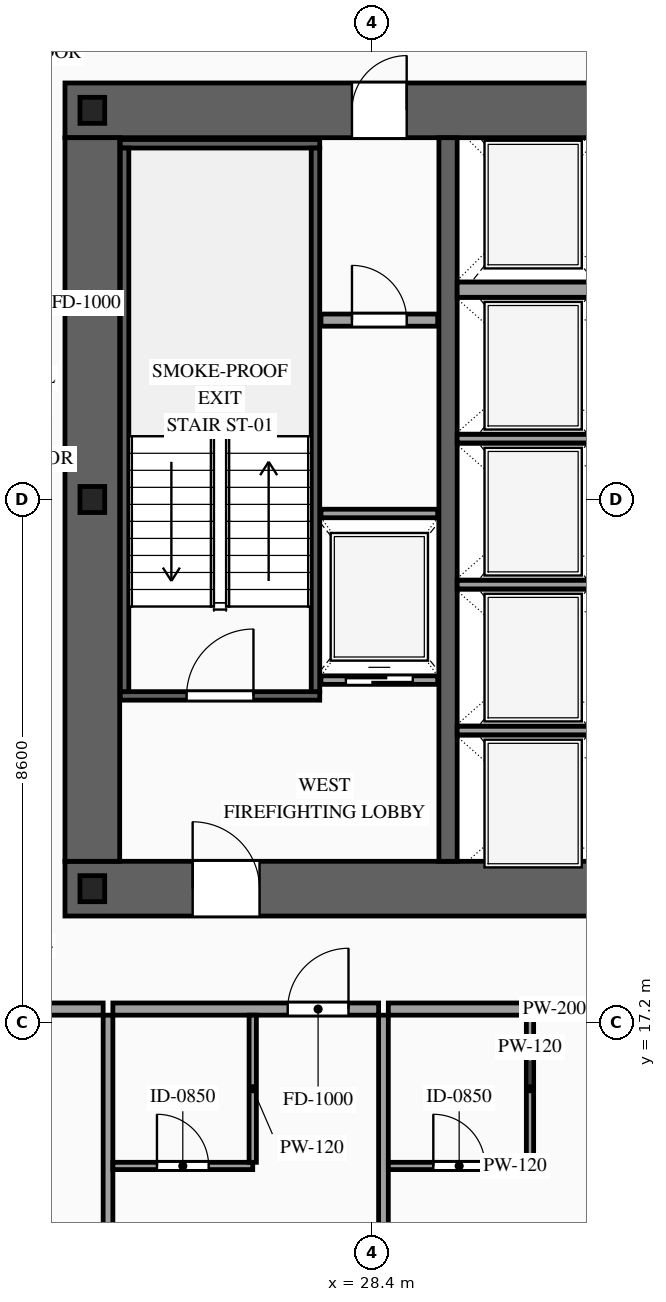
"""IFC4 building model, lengths in metres.
Left out: names, types, materials, properties, quantities, classifications, styles, units other than length and angle.
Written with IfcOpenShell. Run it as: python <this file> out.ifc"""

import sys

from ifc_helpers import new_model, si_unit, direction, frame, frame_2d, origin, origin_2d, place, context, subcontext, project, spatial, rectangle, i_section, extrude, source, transform, mapped, element, fill, save


model = new_model("IFC4")
c1 = context("Model", 3, precision=1e-05, world=origin(), true_north=direction((0.0, 1.0)))
c2 = subcontext(c1, "Body", "Model", "MODEL_VIEW")
j1 = project(units=[si_unit("LENGTHUNIT", "METRE"), si_unit("PLANEANGLEUNIT", "RADIAN")], contexts=[c1])
p1 = place(None, origin())
s1 = spatial("IfcSite", under=j1, at=p1, CompositionType="ELEMENT")
p2 = place(p1, origin())
s2 = spatial("IfcBuilding", under=s1, at=p2, CompositionType="ELEMENT")
p3 = place(p2, frame((0.0, 0.0, 74.8)))
s3 = spatial("IfcBuildingStorey", under=s2, at=p3, CompositionType="ELEMENT", Elevation=74.8)
p4 = place(p3, frame((23.35, 19.4, 0.0), z_axis=(0.0, 0.0, 1.0), x_axis=(1.0, 0.0, 0.0)))
e1 = element("IfcWall", 1, at=p4, inside=s3, PredefinedType="SHEAR", context=c2, shape_type="SweptSolid", body=[
    extrude(rectangle(XDim=27.3, YDim=0.9, at=frame_2d((13.65, 0.0))), origin(), (0.0, 0.0, 1.0), 3.6),
])
p5 = place(p4, frame((2.1, 0.0, 0.0)))
e2 = element("IfcOpeningElement", 2, at=p5, cuts=e1, PredefinedType="OPENING", context=c2, shape_type="SweptSolid", body=[
    extrude(rectangle(XDim=1.1, YDim=2.2, at=frame_2d((0.55, 1.1))), frame((0.0, 0.465, 0.0), z_axis=(0.0, -1.0, 0.0), x_axis=(1.0, 0.0, 0.0)), (0.0, 0.0, 1.0), 0.93),
])
p6 = place(p4, frame((10.0, 0.0, 0.0)))
e3 = element("IfcOpeningElement", 3, at=p6, cuts=e1, PredefinedType="OPENING", context=c2, shape_type="SweptSolid", body=[
    extrude(rectangle(XDim=1.1, YDim=2.2, at=frame_2d((0.55, 1.1))), frame((0.0, 0.465, 0.0), z_axis=(0.0, -1.0, 0.0), x_axis=(1.0, 0.0, 0.0)), (0.0, 0.0, 1.0), 0.93),
])
p7 = place(p4, frame((23.2, 0.0, 0.0)))
e4 = element("IfcOpeningElement", 4, at=p7, cuts=e1, PredefinedType="OPENING", context=c2, shape_type="SweptSolid", body=[
    extrude(rectangle(XDim=1.1, YDim=2.2, at=frame_2d((0.55, 1.1))), frame((0.0, 0.465, 0.0), z_axis=(0.0, -1.0, 0.0), x_axis=(1.0, 0.0, 0.0)), (0.0, 0.0, 1.0), 0.93),
])
p8 = place(p4, frame((19.82, 0.0, 0.0)))
e5 = element("IfcOpeningElement", 5, at=p8, cuts=e1, PredefinedType="OPENING", context=c2, shape_type="SweptSolid", body=[
    extrude(rectangle(XDim=0.9, YDim=2.15, at=frame_2d((0.45, 1.075))), frame((0.0, 0.465, 0.0), z_axis=(0.0, -1.0, 0.0), x_axis=(1.0, 0.0, 0.0)), (0.0, 0.0, 1.0), 0.93),
])
p9 = place(p4, frame((18.38, 0.0, 0.0)))
e6 = element("IfcOpeningElement", 6, at=p9, cuts=e1, PredefinedType="OPENING", context=c2, shape_type="SweptSolid", body=[
    extrude(rectangle(XDim=0.9, YDim=2.15, at=frame_2d((0.45, 1.075))), frame((0.0, 0.465, 0.0), z_axis=(0.0, -1.0, 0.0), x_axis=(1.0, 0.0, 0.0)), (0.0, 0.0, 1.0), 0.93),
])
p10 = place(p3, frame((23.35, 32.2, 0.0), z_axis=(0.0, 0.0, 1.0), x_axis=(1.0, 0.0, 0.0)))
e7 = element("IfcWall", 7, at=p10, inside=s3, PredefinedType="SHEAR", context=c2, shape_type="SweptSolid", body=[
    extrude(rectangle(XDim=27.3, YDim=0.9, at=frame_2d((13.65, 0.0))), origin(), (0.0, 0.0, 1.0), 3.6),
])
p11 = place(p10, frame((4.72, 0.0, 0.0)))
e8 = element("IfcOpeningElement", 8, at=p11, cuts=e7, PredefinedType="OPENING", context=c2, shape_type="SweptSolid", body=[
    extrude(rectangle(XDim=0.9, YDim=2.15, at=frame_2d((0.45, 1.075))), frame((0.0, 0.465, 0.0), z_axis=(0.0, -1.0, 0.0), x_axis=(1.0, 0.0, 0.0)), (0.0, 0.0, 1.0), 0.93),
])
p12 = place(p10, frame((10.0, 0.0, 0.0)))
e9 = element("IfcOpeningElement", 9, at=p12, cuts=e7, PredefinedType="OPENING", context=c2, shape_type="SweptSolid", body=[
    extrude(rectangle(XDim=1.1, YDim=2.2, at=frame_2d((0.55, 1.1))), frame((0.0, 0.465, 0.0), z_axis=(0.0, -1.0, 0.0), x_axis=(1.0, 0.0, 0.0)), (0.0, 0.0, 1.0), 0.93),
])
p13 = place(p10, frame((15.85, 0.0, 0.0)))
e10 = element("IfcOpeningElement", 10, at=p13, cuts=e7, PredefinedType="OPENING", context=c2, shape_type="SweptSolid", body=[
    extrude(rectangle(XDim=1.1, YDim=2.2, at=frame_2d((0.55, 1.1))), frame((0.0, 0.465, 0.0), z_axis=(0.0, -1.0, 0.0), x_axis=(1.0, 0.0, 0.0)), (0.0, 0.0, 1.0), 0.93),
])
p14 = place(p10, frame((18.38, 0.0, 0.0)))
e11 = element("IfcOpeningElement", 11, at=p14, cuts=e7, PredefinedType="OPENING", context=c2, shape_type="SweptSolid", body=[
    extrude(rectangle(XDim=0.9, YDim=2.15, at=frame_2d((0.45, 1.075))), frame((0.0, 0.465, 0.0), z_axis=(0.0, -1.0, 0.0), x_axis=(1.0, 0.0, 0.0)), (0.0, 0.0, 1.0), 0.93),
])
p15 = place(p10, frame((19.82, 0.0, 0.0)))
e12 = element("IfcOpeningElement", 12, at=p15, cuts=e7, PredefinedType="OPENING", context=c2, shape_type="SweptSolid", body=[
    extrude(rectangle(XDim=0.9, YDim=2.15, at=frame_2d((0.45, 1.075))), frame((0.0, 0.465, 0.0), z_axis=(0.0, -1.0, 0.0), x_axis=(1.0, 0.0, 0.0)), (0.0, 0.0, 1.0), 0.93),
])
m1 = source(origin(), c2, "Body", "SweptSolid", [
    extrude(rectangle(XDim=11.9, YDim=0.9, at=frame_2d((5.95, 0.0))), origin(), (0.0, 0.0, 1.0), 3.6),
])
p16 = place(p3, frame((23.8, 19.85, 0.0), z_axis=(0.0, 0.0, 1.0), x_axis=(0.0, 1.0, 0.0)))
e13 = element("IfcWall", 13, at=p16, inside=s3, PredefinedType="SHEAR", context=c2, shape_type="MappedRepresentation", body=[
    mapped(m1, transform((0.0, 0.0, 0.0), scale=1.0)),
])
m2 = source(origin(), c2, "Body", "SweptSolid", [
    extrude(rectangle(XDim=11.9, YDim=0.3, at=frame_2d((5.95, 0.0))), origin(), (0.0, 0.0, 1.0), 3.6),
])
p17 = place(p3, frame((29.65, 19.85, 0.0), z_axis=(0.0, 0.0, 1.0), x_axis=(0.0, 1.0, 0.0)))
e14 = element("IfcWall", 14, at=p17, inside=s3, PredefinedType="SOLIDWALL", context=c2, shape_type="MappedRepresentation", body=[
    mapped(m2, transform((0.0, 0.0, 0.0), scale=1.0)),
])
m3 = source(origin(), c2, "Body", "SweptSolid", [
    extrude(i_section(OverallWidth=0.407, OverallDepth=0.428, WebThickness=0.02, FlangeThickness=0.035, at=origin_2d()), origin(), (0.0, 0.0, 1.0), 3.6),
])
for number, where, z_axis, x_axis in (
    (15, (23.8, 19.4, 0.0), (0.0, 0.0, 1.0), (1.0, 0.0, 0.0)),
    (16, (23.8, 25.8, 0.0), (0.0, 0.0, 1.0), (1.0, 0.0, 0.0)),
    (17, (23.8, 32.2, 0.0), (0.0, 0.0, 1.0), (1.0, 0.0, 0.0)),
):
    element("IfcColumn", number, at=place(p3, frame(where, z_axis=z_axis, x_axis=x_axis)), inside=s3, PredefinedType="COLUMN", context=c2, shape_type="MappedRepresentation", body=[
        mapped(m3, transform((0.0, 0.0, 0.0), scale=1.0)),
    ])
p18 = place(p3, frame((27.56, 22.83, 0.0), z_axis=(0.0, 0.0, 1.0), x_axis=(1.0, 0.0, 0.0)))
e18 = element("IfcWall", 18, at=p18, inside=s3, PredefinedType="SOLIDWALL", context=c2, shape_type="SweptSolid", body=[
    extrude(rectangle(XDim=1.92, YDim=0.14, at=frame_2d((0.96, 0.0))), origin(), (0.0, 0.0, 1.0), 3.38),
])
p19 = place(p18, frame((0.41, 0.0, 0.0)))
e19 = element("IfcOpeningElement", 19, at=p19, cuts=e18, PredefinedType="OPENING", context=c2, shape_type="SweptSolid", body=[
    extrude(rectangle(XDim=1.1, YDim=2.2, at=frame_2d((0.55, 1.1))), frame((0.0, 0.085, 0.0), z_axis=(0.0, -1.0, 0.0), x_axis=(1.0, 0.0, 0.0)), (0.0, 0.0, 1.0), 0.17),
])
m4 = source(origin(), c2, "Body", "SweptSolid", [
    extrude(rectangle(XDim=1.92, YDim=0.14, at=frame_2d((0.96, 0.0))), origin(), (0.0, 0.0, 1.0), 3.38),
])
p20 = place(p3, frame((27.56, 25.57, 0.0), z_axis=(0.0, 0.0, 1.0), x_axis=(1.0, 0.0, 0.0)))
e20 = element("IfcWall", 20, at=p20, inside=s3, PredefinedType="SOLIDWALL", context=c2, shape_type="MappedRepresentation", body=[
    mapped(m4, transform((0.0, 0.0, 0.0), scale=1.0)),
])
m5 = source(origin(), c2, "Body", "SweptSolid", [
    extrude(rectangle(XDim=2.5, YDim=0.14, at=frame_2d((1.25, 0.0))), origin(), (0.0, 0.0, 1.0), 3.38),
])
for number, where, z_axis, x_axis in (
    (21, (29.8, 22.0, 0.0), (0.0, 0.0, 1.0), (1.0, 0.0, 0.0)),
    (22, (29.8, 24.4, 0.0), (0.0, 0.0, 1.0), (1.0, 0.0, 0.0)),
    (23, (29.8, 26.8, 0.0), (0.0, 0.0, 1.0), (1.0, 0.0, 0.0)),
):
    element("IfcWall", number, at=place(p3, frame(where, z_axis=z_axis, x_axis=x_axis)), inside=s3, PredefinedType="SOLIDWALL", context=c2, shape_type="MappedRepresentation", body=[
        mapped(m5, transform((0.0, 0.0, 0.0), scale=1.0)),
    ])
m6 = source(origin(), c2, "Body", "SweptSolid", [
    extrude(rectangle(XDim=2.5, YDim=0.25, at=frame_2d((1.25, 0.0))), origin(), (0.0, 0.0, 1.0), 3.38),
])
p21 = place(p3, frame((29.8, 29.25, 0.0), z_axis=(0.0, 0.0, 1.0), x_axis=(1.0, 0.0, 0.0)))
e24 = element("IfcWall", 24, at=p21, inside=s3, PredefinedType="SOLIDWALL", context=c2, shape_type="MappedRepresentation", body=[
    mapped(m6, transform((0.0, 0.0, 0.0), scale=1.0)),
])
p22 = place(p3, frame((24.26, 22.57, 0.0), z_axis=(0.0, 0.0, 1.0), x_axis=(1.0, 0.0, 0.0)))
e25 = element("IfcWall", 25, at=p22, inside=s3, PredefinedType="SOLIDWALL", context=c2, shape_type="SweptSolid", body=[
    extrude(rectangle(XDim=3.28, YDim=0.14, at=frame_2d((1.64, 0.0))), origin(), (0.0, 0.0, 1.0), 3.38),
])
p23 = place(p22, frame((1.09, 0.0, 0.0)))
e26 = element("IfcOpeningElement", 26, at=p23, cuts=e25, PredefinedType="OPENING", context=c2, shape_type="SweptSolid", body=[
    extrude(rectangle(XDim=1.1, YDim=2.2, at=frame_2d((0.55, 1.1))), frame((0.0, 0.085, 0.0), z_axis=(0.0, -1.0, 0.0), x_axis=(1.0, 0.0, 0.0)), (0.0, 0.0, 1.0), 0.17),
])
m7 = source(origin(), c2, "Body", "SweptSolid", [
    extrude(rectangle(XDim=3.28, YDim=0.14, at=frame_2d((1.64, 0.0))), origin(), (0.0, 0.0, 1.0), 3.38),
])
p24 = place(p3, frame((24.26, 31.65, 0.0), z_axis=(0.0, 0.0, 1.0), x_axis=(1.0, 0.0, 0.0)))
e27 = element("IfcWall", 27, at=p24, inside=s3, PredefinedType="SOLIDWALL", context=c2, shape_type="MappedRepresentation", body=[
    mapped(m7, transform((0.0, 0.0, 0.0), scale=1.0)),
])
m8 = source(origin(), c2, "Body", "SweptSolid", [
    extrude(rectangle(XDim=8.94, YDim=0.14, at=frame_2d((4.47, 0.0))), origin(), (0.0, 0.0, 1.0), 3.38),
])
for number, where, z_axis, x_axis in (
    (28, (24.33, 22.64, 0.0), (0.0, 0.0, 1.0), (0.0, 1.0, 0.0)),
    (29, (27.47, 22.64, 0.0), (0.0, 0.0, 1.0), (0.0, 1.0, 0.0)),
):
    element("IfcWall", number, at=place(p3, frame(where, z_axis=z_axis, x_axis=x_axis)), inside=s3, PredefinedType="SOLIDWALL", context=c2, shape_type="MappedRepresentation", body=[
        mapped(m8, transform((0.0, 0.0, 0.0), scale=1.0)),
    ])
p25 = place(p3, frame((27.56, 28.75, 0.0), z_axis=(0.0, 0.0, 1.0), x_axis=(1.0, 0.0, 0.0)))
e30 = element("IfcWall", 30, at=p25, inside=s3, PredefinedType="PARTITIONING", context=c2, shape_type="SweptSolid", body=[
    extrude(rectangle(XDim=1.92, YDim=0.2, at=frame_2d((0.96, 0.0))), origin(), (0.0, 0.0, 1.0), 3.38),
])
p26 = place(p25, frame((0.51, 0.0, 0.0)))
e31 = element("IfcOpeningElement", 31, at=p26, cuts=e30, PredefinedType="OPENING", context=c2, shape_type="SweptSolid", body=[
    extrude(rectangle(XDim=0.9, YDim=2.15, at=frame_2d((0.45, 1.075))), frame((0.0, 0.115, 0.0), z_axis=(0.0, -1.0, 0.0), x_axis=(1.0, 0.0, 0.0)), (0.0, 0.0, 1.0), 0.23),
])
p27 = place(p3, frame((14.94, 17.42, 0.0), z_axis=(0.0, 0.0, 1.0), x_axis=(1.0, 0.0, 0.0)))
e32 = element("IfcWall", 32, at=p27, inside=s3, PredefinedType="PARTITIONING", context=c2, shape_type="SweptSolid", body=[
    extrude(rectangle(XDim=9.038, YDim=0.2, at=frame_2d((4.519, 0.0))), origin(), (0.0, 0.0, 1.0), 3.38),
])
p28 = place(p27, frame((5.224, 0.0, 0.0)))
e33 = element("IfcOpeningElement", 33, at=p28, cuts=e32, PredefinedType="OPENING", context=c2, shape_type="SweptSolid", body=[
    extrude(rectangle(XDim=1.0, YDim=2.2, at=frame_2d((0.5, 1.1))), frame((0.0, 0.115, 0.0), z_axis=(0.0, -1.0, 0.0), x_axis=(1.0, 0.0, 0.0)), (0.0, 0.0, 1.0), 0.23),
])
m9 = source(origin(), c2, "Body", "SweptSolid", [
    extrude(rectangle(XDim=16.47, YDim=0.16, at=frame_2d((8.235, 0.0))), origin(), (0.0, 0.0, 1.0), 3.38),
])
p29 = place(p3, frame((24.058, 0.85, 0.0), z_axis=(0.0, 0.0, 1.0), x_axis=(0.0, 1.0, 0.0)))
e34 = element("IfcWall", 34, at=p29, inside=s3, PredefinedType="PARTITIONING", context=c2, shape_type="MappedRepresentation", body=[
    mapped(m9, transform((0.0, 0.0, 0.0), scale=1.0)),
])
p30 = place(p3, frame((24.138, 17.42, 0.0), z_axis=(0.0, 0.0, 1.0), x_axis=(1.0, 0.0, 0.0)))
e35 = element("IfcWall", 35, at=p30, inside=s3, PredefinedType="PARTITIONING", context=c2, shape_type="SweptSolid", body=[
    extrude(rectangle(XDim=4.37, YDim=0.2, at=frame_2d((2.185, 0.0))), origin(), (0.0, 0.0, 1.0), 3.38),
])
p31 = place(p30, frame((2.875, 0.0, 0.0)))
e36 = element("IfcOpeningElement", 36, at=p31, cuts=e35, PredefinedType="OPENING", context=c2, shape_type="SweptSolid", body=[
    extrude(rectangle(XDim=1.0, YDim=2.2, at=frame_2d((0.5, 1.1))), frame((0.0, 0.115, 0.0), z_axis=(0.0, -1.0, 0.0), x_axis=(1.0, 0.0, 0.0)), (0.0, 0.0, 1.0), 0.23),
])
p32 = place(p3, frame((28.588, 0.85, 0.0), z_axis=(0.0, 0.0, 1.0), x_axis=(0.0, 1.0, 0.0)))
e37 = element("IfcWall", 37, at=p32, inside=s3, PredefinedType="PARTITIONING", context=c2, shape_type="MappedRepresentation", body=[
    mapped(m9, transform((0.0, 0.0, 0.0), scale=1.0)),
])
p33 = place(p3, frame((24.138, 14.84, 0.0), z_axis=(0.0, 0.0, 1.0), x_axis=(1.0, 0.0, 0.0)))
e38 = element("IfcWall", 38, at=p33, inside=s3, PredefinedType="PARTITIONING", context=c2, shape_type="SweptSolid", body=[
    extrude(rectangle(XDim=2.3, YDim=0.12, at=frame_2d((1.15, 0.0))), origin(), (0.0, 0.0, 1.0), 3.38),
])
p34 = place(p33, frame((0.725, 0.0, 0.0)))
e39 = element("IfcOpeningElement", 39, at=p34, cuts=e38, PredefinedType="OPENING", context=c2, shape_type="SweptSolid", body=[
    extrude(rectangle(XDim=0.85, YDim=2.1, at=frame_2d((0.425, 1.05))), frame((0.0, 0.075, 0.0), z_axis=(0.0, -1.0, 0.0), x_axis=(1.0, 0.0, 0.0)), (0.0, 0.0, 1.0), 0.15),
])
m10 = source(origin(), c2, "Body", "SweptSolid", [
    extrude(rectangle(XDim=2.42, YDim=0.12, at=frame_2d((1.21, 0.0))), origin(), (0.0, 0.0, 1.0), 3.38),
])
p35 = place(p3, frame((26.438, 14.9, 0.0), z_axis=(0.0, 0.0, 1.0), x_axis=(0.0, 1.0, 0.0)))
e40 = element("IfcWall", 40, at=p35, inside=s3, PredefinedType="PARTITIONING", context=c2, shape_type="MappedRepresentation", body=[
    mapped(m10, transform((0.0, 0.0, 0.0), scale=1.0)),
])
p36 = place(p3, frame((28.668, 17.42, 0.0), z_axis=(0.0, 0.0, 1.0), x_axis=(1.0, 0.0, 0.0)))
e41 = element("IfcWall", 41, at=p36, inside=s3, PredefinedType="PARTITIONING", context=c2, shape_type="SweptSolid", body=[
    extrude(rectangle(XDim=10.017, YDim=0.2, at=frame_2d((5.009, 0.0))), origin(), (0.0, 0.0, 1.0), 3.38),
])
p37 = place(p36, frame((5.714, 0.0, 0.0)))
e42 = element("IfcOpeningElement", 42, at=p37, cuts=e41, PredefinedType="OPENING", context=c2, shape_type="SweptSolid", body=[
    extrude(rectangle(XDim=1.0, YDim=2.2, at=frame_2d((0.5, 1.1))), frame((0.0, 0.115, 0.0), z_axis=(0.0, -1.0, 0.0), x_axis=(1.0, 0.0, 0.0)), (0.0, 0.0, 1.0), 0.23),
])
p38 = place(p3, frame((28.668, 14.84, 0.0), z_axis=(0.0, 0.0, 1.0), x_axis=(1.0, 0.0, 0.0)))
e43 = element("IfcWall", 43, at=p38, inside=s3, PredefinedType="PARTITIONING", context=c2, shape_type="SweptSolid", body=[
    extrude(rectangle(XDim=2.33, YDim=0.12, at=frame_2d((1.165, 0.0))), origin(), (0.0, 0.0, 1.0), 3.38),
])
p39 = place(p38, frame((0.74, 0.0, 0.0)))
e44 = element("IfcOpeningElement", 44, at=p39, cuts=e43, PredefinedType="OPENING", context=c2, shape_type="SweptSolid", body=[
    extrude(rectangle(XDim=0.85, YDim=2.1, at=frame_2d((0.425, 1.05))), frame((0.0, 0.075, 0.0), z_axis=(0.0, -1.0, 0.0), x_axis=(1.0, 0.0, 0.0)), (0.0, 0.0, 1.0), 0.15),
])
p40 = place(p3, frame((30.998, 14.9, 0.0), z_axis=(0.0, 0.0, 1.0), x_axis=(0.0, 1.0, 0.0)))
e45 = element("IfcWall", 45, at=p40, inside=s3, PredefinedType="PARTITIONING", context=c2, shape_type="MappedRepresentation", body=[
    mapped(m10, transform((0.0, 0.0, 0.0), scale=1.0)),
])
m11 = source(origin(), c2, "Body", "SweptSolid", [
    extrude(rectangle(XDim=1.1, YDim=2.2, at=frame_2d((0.55, 1.1))), frame((0.0, 0.025, 0.0), z_axis=(0.0, -1.0, 0.0), x_axis=(1.0, 0.0, 0.0)), (0.0, 0.0, 1.0), 0.05),
])
p41 = place(p19, origin())
e46 = element("IfcDoor", 46, at=p41, inside=s3, OperationType="SLIDING_TO_LEFT", PredefinedType="DOOR", context=c2, shape_type="MappedRepresentation", body=[
    mapped(m11, transform((0.0, 0.0, 0.0), scale=1.0)),
])
fill(e19, e46)
m12 = source(origin(), c2, "Body", "SweptSolid", [
    extrude(rectangle(XDim=1.1, YDim=2.2, at=frame_2d((0.55, 1.1))), frame((0.0, 0.025, 0.0), z_axis=(0.0, -1.0, 0.0), x_axis=(1.0, 0.0, 0.0)), (0.0, 0.0, 1.0), 0.05),
])
p42 = place(p23, origin())
e47 = element("IfcDoor", 47, at=p42, inside=s3, OperationType="SINGLE_SWING_RIGHT", PredefinedType="DOOR", context=c2, shape_type="MappedRepresentation", body=[
    mapped(m12, transform((0.0, 0.0, 0.0), scale=1.0)),
])
fill(e26, e47)
p43 = place(p5, origin())
e48 = element("IfcDoor", 48, at=p43, inside=s3, OperationType="SINGLE_SWING_LEFT", PredefinedType="DOOR", context=c2, shape_type="MappedRepresentation", body=[
    mapped(m12, transform((0.0, 0.0, 0.0), scale=1.0)),
])
fill(e2, e48)
m13 = source(origin(), c2, "Body", "SweptSolid", [
    extrude(rectangle(XDim=0.9, YDim=2.15, at=frame_2d((0.45, 1.075))), frame((0.0, 0.025, 0.0), z_axis=(0.0, -1.0, 0.0), x_axis=(1.0, 0.0, 0.0)), (0.0, 0.0, 1.0), 0.05),
])
p44 = place(p11, origin())
e49 = element("IfcDoor", 49, at=p44, inside=s3, OperationType="SINGLE_SWING_RIGHT", PredefinedType="DOOR", context=c2, shape_type="MappedRepresentation", body=[
    mapped(m13, transform((0.0, 0.0, 0.0), scale=1.0)),
])
fill(e8, e49)
p45 = place(p26, origin())
e50 = element("IfcDoor", 50, at=p45, inside=s3, OperationType="SINGLE_SWING_LEFT", PredefinedType="DOOR", context=c2, shape_type="MappedRepresentation", body=[
    mapped(m13, transform((0.0, 0.0, 0.0), scale=1.0)),
])
fill(e31, e50)
m14 = source(origin(), c2, "Body", "SweptSolid", [
    extrude(rectangle(XDim=1.0, YDim=2.2, at=frame_2d((0.5, 1.1))), frame((0.0, 0.025, 0.0), z_axis=(0.0, -1.0, 0.0), x_axis=(1.0, 0.0, 0.0)), (0.0, 0.0, 1.0), 0.05),
])
p46 = place(p31, origin())
e51 = element("IfcDoor", 51, at=p46, inside=s3, OperationType="SINGLE_SWING_RIGHT", PredefinedType="DOOR", context=c2, shape_type="MappedRepresentation", body=[
    mapped(m14, transform((0.0, 0.0, 0.0), scale=1.0)),
])
fill(e36, e51)
m15 = source(origin(), c2, "Body", "SweptSolid", [
    extrude(rectangle(XDim=0.85, YDim=2.1, at=frame_2d((0.425, 1.05))), frame((0.0, 0.025, 0.0), z_axis=(0.0, -1.0, 0.0), x_axis=(1.0, 0.0, 0.0)), (0.0, 0.0, 1.0), 0.05),
])
p47 = place(p34, origin())
e52 = element("IfcDoor", 52, at=p47, inside=s3, OperationType="SINGLE_SWING_LEFT", PredefinedType="DOOR", context=c2, shape_type="MappedRepresentation", body=[
    mapped(m15, transform((0.0, 0.0, 0.0), scale=1.0)),
])
fill(e39, e52)
p48 = place(p39, origin())
e53 = element("IfcDoor", 53, at=p48, inside=s3, OperationType="SINGLE_SWING_LEFT", PredefinedType="DOOR", context=c2, shape_type="MappedRepresentation", body=[
    mapped(m15, transform((0.0, 0.0, 0.0), scale=1.0)),
])
fill(e44, e53)
save(model, sys.argv[1])
